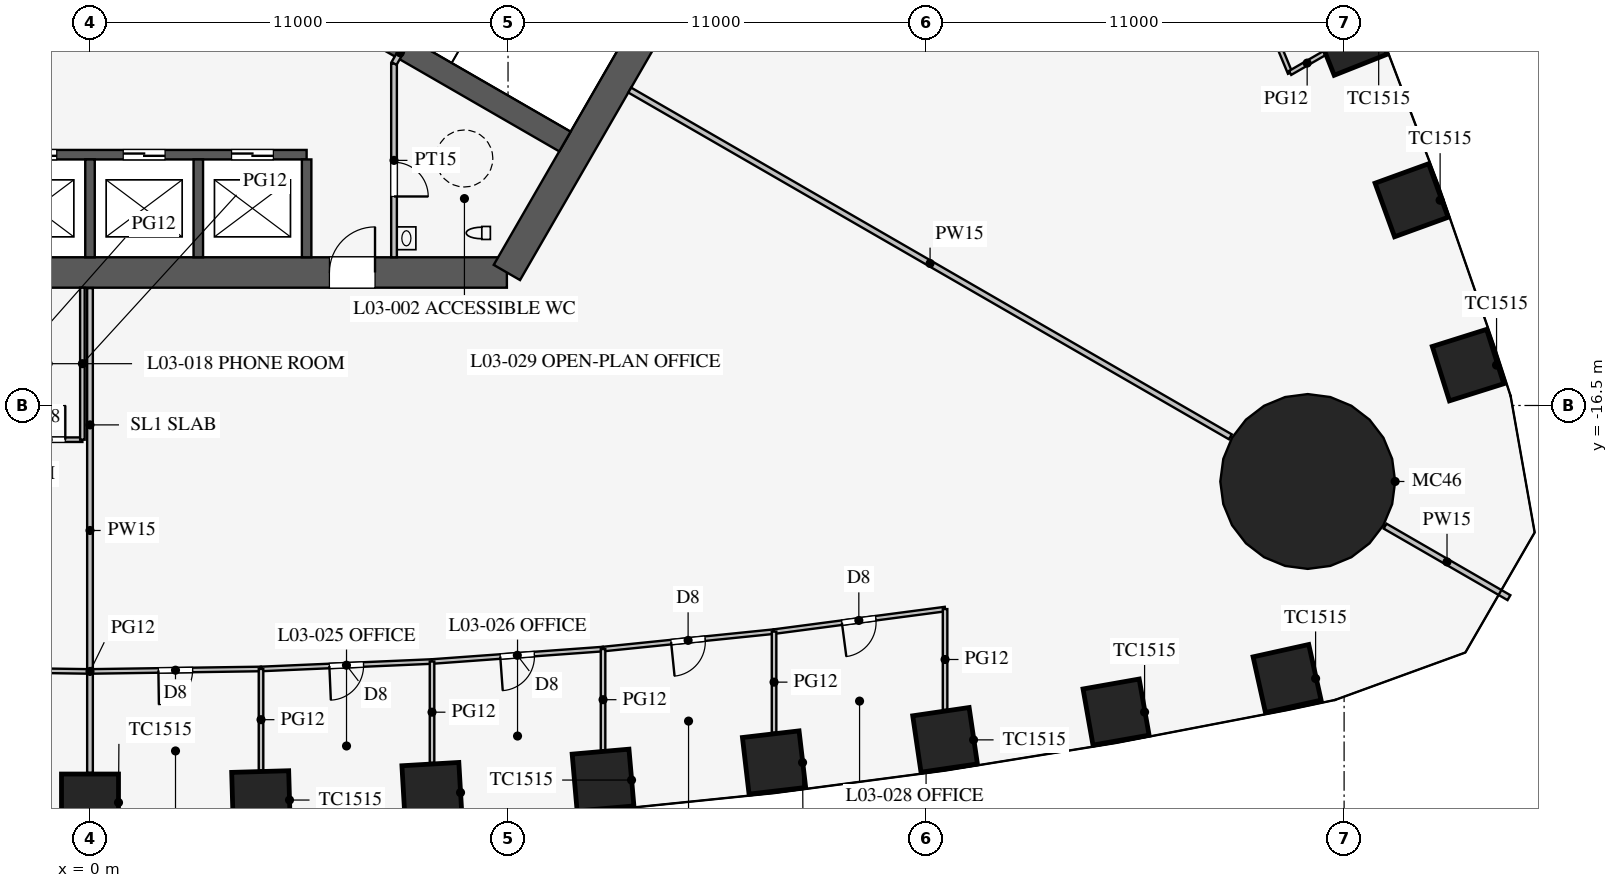
"""IFC4 building model, lengths in metres.
Left out: names, types, materials, properties, quantities, classifications, styles, units other than length and angle.
Written with IfcOpenShell. Run it as: python <this file> out.ifc"""

import sys

from ifc_helpers import new_model, si_unit, direction, frame, frame_2d, origin, origin_2d, place, context, subcontext, project, spatial, rectangle, circle, extrude, element, fill, save


model = new_model("IFC4")
c1 = context("Model", 3, precision=1e-05, world=origin(), true_north=direction((0.0, 1.0)))
c2 = subcontext(c1, "Body", "Model", "MODEL_VIEW")
j1 = project(units=[si_unit("LENGTHUNIT", "METRE"), si_unit("PLANEANGLEUNIT", "RADIAN")], contexts=[c1])
p1 = place(None, origin())
s1 = spatial("IfcSite", under=j1, at=p1, CompositionType="ELEMENT")
p2 = place(p1, origin())
s2 = spatial("IfcBuilding", under=s1, at=p2, CompositionType="ELEMENT")
p3 = place(p2, frame((0.0, 0.0, 16.5)))
s3 = spatial("IfcBuildingStorey", under=s2, at=p3, CompositionType="ELEMENT", Elevation=16.5)
for number, where, z_axis, x_axis in (
    (1, (0.0, -26.949, 0.0), (0.0, 0.0, 1.0), (1.0, 0.0, 0.0)),
    (2, (4.5, -26.883, 0.0), (0.0, 0.0, 1.0), (1.0, 0.029, 0.0)),
    (3, (9.0, -26.686, 0.0), (0.0, 0.0, 1.0), (0.998, 0.058, 0.0)),
    (4, (13.5, -26.357, 0.0), (0.0, 0.0, 1.0), (0.996, 0.087, 0.0)),
    (5, (18.0, -25.895, 0.0), (0.0, 0.0, 1.0), (0.993, 0.116, 0.0)),
    (6, (22.5, -25.299, 0.0), (0.0, 0.0, 1.0), (0.989, 0.145, 0.0)),
    (7, (27.0, -24.568, 0.0), (0.0, 0.0, 1.0), (0.985, 0.174, 0.0)),
    (8, (31.5, -23.685, 0.0), (0.0, 0.0, 1.0), (0.976, 0.217, 0.0)),
    (9, (36.262, -15.438, 0.0), (0.0, 0.0, 1.0), (-0.3, 0.954, 0.0)),
    (10, (34.776, -11.099, 0.0), (0.0, 0.0, 1.0), (-0.342, 0.94, 0.0)),
    (11, (33.16, -6.836, 0.0), (0.0, 0.0, 1.0), (-0.369, 0.929, 0.0)),
):
    element("IfcColumn", number, at=place(p3, frame(where, z_axis=z_axis, x_axis=x_axis)), inside=s3, PredefinedType="COLUMN", context=c2, shape_type="SweptSolid", body=[
        extrude(rectangle(XDim=1.5, YDim=1.5, at=origin_2d()), origin(), (0.0, 0.0, 1.0), 4.2),
    ])
p4 = place(p3, frame((32.043, -18.5, 0.0), z_axis=(0.0, 0.0, 1.0), x_axis=(1.0, 0.0, 0.0)))
e12 = element("IfcColumn", 12, at=p4, inside=s3, PredefinedType="COLUMN", context=c2, shape_type="SweptSolid", body=[
    extrude(circle(Radius=2.3, at=origin_2d()), origin(), (0.0, 0.0, 1.0), 4.2),
])
p5 = place(p3, frame((-10.97, -13.0, 0.0), z_axis=(0.0, 0.0, 1.0), x_axis=(1.0, 0.0, 0.0)))
e13 = element("IfcWall", 13, at=p5, inside=s3, PredefinedType="SHEAR", context=c2, shape_type="SweptSolid", body=[
    extrude(rectangle(XDim=21.939, YDim=0.8, at=frame_2d((10.97, 0.0))), origin(), (0.0, 0.0, 1.0), 4.2),
])
p6 = place(p5, frame((17.27, 0.0, 0.0)))
e14 = element("IfcOpeningElement", 14, at=p6, cuts=e13, PredefinedType="OPENING", context=c2, shape_type="SweptSolid", body=[
    extrude(rectangle(XDim=1.2, YDim=2.1, at=frame_2d((0.6, 1.05))), frame((0.0, 0.41, 0.0), z_axis=(0.0, -1.0, 0.0), x_axis=(1.0, 0.0, 0.0)), (0.0, 0.0, 1.0), 0.82),
])
p7 = place(p5, frame((3.47, 0.0, 0.0)))
e15 = element("IfcOpeningElement", 15, at=p7, cuts=e13, PredefinedType="OPENING", context=c2, shape_type="SweptSolid", body=[
    extrude(rectangle(XDim=1.2, YDim=2.1, at=frame_2d((0.6, 1.05))), frame((0.0, 0.41, 0.0), z_axis=(0.0, -1.0, 0.0), x_axis=(1.0, 0.0, 0.0)), (0.0, 0.0, 1.0), 0.82),
])
p8 = place(p3, frame((10.97, -13.0, 0.0), z_axis=(0.0, 0.0, 1.0), x_axis=(0.499995765644, 0.866027848477, 0.0)))
e16 = element("IfcWall", 16, at=p8, inside=s3, PredefinedType="SHEAR", context=c2, shape_type="SweptSolid", body=[
    extrude(rectangle(XDim=11.547, YDim=0.8, at=frame_2d((5.773, 0.0))), origin(), (0.0, 0.0, 1.0), 4.2),
])
p9 = place(p3, frame((-5.7, -9.9, 0.0), z_axis=(0.0, 0.0, 1.0), x_axis=(1.0, 0.0, 0.0)))
e17 = element("IfcWall", 17, at=p9, inside=s3, PredefinedType="SHEAR", context=c2, shape_type="SweptSolid", body=[
    extrude(rectangle(XDim=11.4, YDim=0.25, at=frame_2d((5.7, 0.0))), origin(), (0.0, 0.0, 1.0), 4.2),
])
p10 = place(p9, frame((0.875, 0.0, 0.0)))
e18 = element("IfcOpeningElement", 18, at=p10, cuts=e17, PredefinedType="OPENING", context=c2, shape_type="SweptSolid", body=[
    extrude(rectangle(XDim=1.1, YDim=2.2, at=frame_2d((0.55, 1.1))), frame((0.0, 0.135, 0.0), z_axis=(0.0, -1.0, 0.0), x_axis=(1.0, 0.0, 0.0)), (0.0, 0.0, 1.0), 0.27),
])
p11 = place(p9, frame((3.725, 0.0, 0.0)))
e19 = element("IfcOpeningElement", 19, at=p11, cuts=e17, PredefinedType="OPENING", context=c2, shape_type="SweptSolid", body=[
    extrude(rectangle(XDim=1.1, YDim=2.2, at=frame_2d((0.55, 1.1))), frame((0.0, 0.135, 0.0), z_axis=(0.0, -1.0, 0.0), x_axis=(1.0, 0.0, 0.0)), (0.0, 0.0, 1.0), 0.27),
])
p12 = place(p9, frame((6.575, 0.0, 0.0)))
e20 = element("IfcOpeningElement", 20, at=p12, cuts=e17, PredefinedType="OPENING", context=c2, shape_type="SweptSolid", body=[
    extrude(rectangle(XDim=1.1, YDim=2.2, at=frame_2d((0.55, 1.1))), frame((0.0, 0.135, 0.0), z_axis=(0.0, -1.0, 0.0), x_axis=(1.0, 0.0, 0.0)), (0.0, 0.0, 1.0), 0.27),
])
p13 = place(p9, frame((9.425, 0.0, 0.0)))
e21 = element("IfcOpeningElement", 21, at=p13, cuts=e17, PredefinedType="OPENING", context=c2, shape_type="SweptSolid", body=[
    extrude(rectangle(XDim=1.1, YDim=2.2, at=frame_2d((0.55, 1.1))), frame((0.0, 0.135, 0.0), z_axis=(0.0, -1.0, 0.0), x_axis=(1.0, 0.0, 0.0)), (0.0, 0.0, 1.0), 0.27),
])
for number, where, z_axis, x_axis in (
    (22, (0.0, -10.025, 0.0), (0.0, 0.0, 1.0), (0.0, -1.0, 0.0)),
    (23, (2.85, -10.025, 0.0), (0.0, 0.0, 1.0), (0.0, -1.0, 0.0)),
    (24, (5.7, -10.025, 0.0), (0.0, 0.0, 1.0), (0.0, -1.0, 0.0)),
):
    element("IfcWall", number, at=place(p3, frame(where, z_axis=z_axis, x_axis=x_axis)), inside=s3, PredefinedType="SHEAR", context=c2, shape_type="SweptSolid", body=[
        extrude(rectangle(XDim=2.575, YDim=0.25, at=frame_2d((1.288, 0.0))), origin(), (0.0, 0.0, 1.0), 4.2),
    ])
p14 = place(p3, frame((4.638, -5.016, 0.0), z_axis=(0.0, 0.0, 1.0), x_axis=(0.866019375473, -0.500010441196, 0.0)))
e25 = element("IfcWall", 25, at=p14, inside=s3, PredefinedType="SHEAR", context=c2, shape_type="SweptSolid", body=[
    extrude(rectangle(XDim=9.075, YDim=0.6, at=frame_2d((4.538, 0.0))), origin(), (0.0, 0.0, 1.0), 4.2),
])
p15 = place(p3, frame((8.0, -7.5, 0.0), z_axis=(0.0, 0.0, 1.0), x_axis=(0.0, -1.0, 0.0)))
e26 = element("IfcWall", 26, at=p15, inside=s3, PredefinedType="PARTITIONING", context=c2, shape_type="SweptSolid", body=[
    extrude(rectangle(XDim=5.1, YDim=0.15, at=frame_2d((2.55, 0.0))), origin(), (0.0, 0.0, 1.0), 4.0),
])
p16 = place(p15, frame((2.6, 0.0, 0.0)))
e27 = element("IfcOpeningElement", 27, at=p16, cuts=e26, PredefinedType="OPENING", context=c2, shape_type="SweptSolid", body=[
    extrude(rectangle(XDim=0.9, YDim=2.1, at=frame_2d((0.45, 1.05))), frame((0.0, 0.085, 0.0), z_axis=(0.0, -1.0, 0.0), x_axis=(1.0, 0.0, 0.0)), (0.0, 0.0, 1.0), 0.17),
])
p17 = place(p3, frame((8.0, -7.5, 0.0), z_axis=(0.0, 0.0, 1.0), x_axis=(0.499842556608, 0.866116284689, 0.0)))
e28 = element("IfcWall", 28, at=p17, inside=s3, PredefinedType="PARTITIONING", context=c2, shape_type="SweptSolid", body=[
    extrude(rectangle(XDim=0.645, YDim=0.15, at=frame_2d((0.323, 0.0))), origin(), (0.0, 0.0, 1.0), 4.0),
])
p18 = place(p3, frame((14.203, -8.2, 0.0), z_axis=(0.0, 0.0, 1.0), x_axis=(0.866024965723, -0.500000758745, 0.0)))
e29 = element("IfcWall", 29, at=p18, inside=s3, PredefinedType="PARTITIONING", context=c2, shape_type="SweptSolid", body=[
    extrude(rectangle(XDim=18.25, YDim=0.15, at=frame_2d((9.125, 0.0))), origin(), (0.0, 0.0, 1.0), 2.3),
])
p19 = place(p3, frame((34.078, -19.675, 0.0), z_axis=(0.0, 0.0, 1.0), x_axis=(0.866019247219, -0.500010663332, 0.0)))
e30 = element("IfcWall", 30, at=p19, inside=s3, PredefinedType="PARTITIONING", context=c2, shape_type="SweptSolid", body=[
    extrude(rectangle(XDim=3.764, YDim=0.15, at=frame_2d((1.882, 0.0))), origin(), (0.0, 0.0, 1.0), 2.3),
])
p20 = place(p3, frame((0.0, -13.41, 0.0), z_axis=(0.0, 0.0, 1.0), x_axis=(0.0, -1.0, 0.0)))
e31 = element("IfcWall", 31, at=p20, inside=s3, PredefinedType="PARTITIONING", context=c2, shape_type="SweptSolid", body=[
    extrude(rectangle(XDim=12.759, YDim=0.15, at=frame_2d((6.379, 0.0))), origin(), (0.0, 0.0, 1.0), 3.2),
])
p21 = place(p3, frame((-2.0, -17.4, 0.0), z_axis=(0.0, 0.0, 1.0), x_axis=(1.0, 0.0, 0.0)))
e32 = element("IfcWall", 32, at=p21, inside=s3, PredefinedType="PARTITIONING", context=c2, shape_type="SweptSolid", body=[
    extrude(rectangle(XDim=1.8, YDim=0.12, at=frame_2d((0.9, 0.0))), origin(), (0.0, 0.0, 1.0), 2.9),
])
p22 = place(p21, frame((0.45, 0.0, 0.15)))
e33 = element("IfcOpeningElement", 33, at=p22, cuts=e32, PredefinedType="OPENING", context=c2, shape_type="SweptSolid", body=[
    extrude(rectangle(XDim=0.9, YDim=2.1, at=frame_2d((0.45, 1.05))), frame((0.0, 0.07, 0.0), z_axis=(0.0, -1.0, 0.0), x_axis=(1.0, 0.0, 0.0)), (0.0, 0.0, 1.0), 0.14),
])
p23 = place(p3, frame((-0.2, -13.4, 0.0), z_axis=(0.0, 0.0, 1.0), x_axis=(0.0, -1.0, 0.0)))
e34 = element("IfcWall", 34, at=p23, inside=s3, PredefinedType="PARTITIONING", context=c2, shape_type="SweptSolid", body=[
    extrude(rectangle(XDim=4.0, YDim=0.12, at=frame_2d((2.0, 0.0))), origin(), (0.0, 0.0, 1.0), 2.9),
])
p24 = place(p3, frame((0.0, -23.499, 0.0), z_axis=(0.0, 0.0, 1.0), x_axis=(0.999894311967, 0.014538393859, 0.0)))
e35 = element("IfcWall", 35, at=p24, inside=s3, PredefinedType="PARTITIONING", context=c2, shape_type="SweptSolid", body=[
    extrude(rectangle(XDim=4.5, YDim=0.12, at=frame_2d((2.25, 0.0))), origin(), (0.0, 0.0, 1.0), 2.9),
])
p25 = place(p24, frame((1.8, 0.0, 0.15)))
e36 = element("IfcOpeningElement", 36, at=p25, cuts=e35, PredefinedType="OPENING", context=c2, shape_type="SweptSolid", body=[
    extrude(rectangle(XDim=0.9, YDim=2.1, at=frame_2d((0.45, 1.05))), frame((0.0, 0.07, 0.0), z_axis=(0.0, -1.0, 0.0), x_axis=(1.0, 0.0, 0.0)), (0.0, 0.0, 1.0), 0.14),
])
p26 = place(p3, frame((13.5, -22.91, 0.0), z_axis=(0.0, 0.0, 1.0), x_axis=(0.994833141332, 0.101523499286, 0.0)))
e37 = element("IfcWall", 37, at=p26, inside=s3, PredefinedType="PARTITIONING", context=c2, shape_type="SweptSolid", body=[
    extrude(rectangle(XDim=4.523, YDim=0.12, at=frame_2d((2.262, 0.0))), origin(), (0.0, 0.0, 1.0), 2.9),
])
p27 = place(p26, frame((1.8, 0.0, 0.15)))
e38 = element("IfcOpeningElement", 38, at=p27, cuts=e37, PredefinedType="OPENING", context=c2, shape_type="SweptSolid", body=[
    extrude(rectangle(XDim=0.9, YDim=2.1, at=frame_2d((0.45, 1.05))), frame((0.0, 0.07, 0.0), z_axis=(0.0, -1.0, 0.0), x_axis=(1.0, 0.0, 0.0)), (0.0, 0.0, 1.0), 0.14),
])
p28 = place(p3, frame((18.0, -22.451, 0.0), z_axis=(0.0, 0.0, 1.0), x_axis=(0.991435244698, 0.130599217346, 0.0)))
e39 = element("IfcWall", 39, at=p28, inside=s3, PredefinedType="PARTITIONING", context=c2, shape_type="SweptSolid", body=[
    extrude(rectangle(XDim=4.539, YDim=0.12, at=frame_2d((2.27, 0.0))), origin(), (0.0, 0.0, 1.0), 2.9),
])
p29 = place(p28, frame((1.8, 0.0, 0.15)))
e40 = element("IfcOpeningElement", 40, at=p29, cuts=e39, PredefinedType="OPENING", context=c2, shape_type="SweptSolid", body=[
    extrude(rectangle(XDim=0.9, YDim=2.1, at=frame_2d((0.45, 1.05))), frame((0.0, 0.07, 0.0), z_axis=(0.0, -1.0, 0.0), x_axis=(1.0, 0.0, 0.0)), (0.0, 0.0, 1.0), 0.14),
])
p30 = place(p3, frame((4.5, -23.433, 0.0), z_axis=(0.0, 0.0, 1.0), x_axis=(0.999052370647, 0.043524254212, 0.0)))
e41 = element("IfcWall", 41, at=p30, inside=s3, PredefinedType="PARTITIONING", context=c2, shape_type="SweptSolid", body=[
    extrude(rectangle(XDim=4.504, YDim=0.12, at=frame_2d((2.252, 0.0))), origin(), (0.0, 0.0, 1.0), 2.9),
])
p31 = place(p30, frame((1.8, 0.0, 0.15)))
e42 = element("IfcOpeningElement", 42, at=p31, cuts=e41, PredefinedType="OPENING", context=c2, shape_type="SweptSolid", body=[
    extrude(rectangle(XDim=0.9, YDim=2.1, at=frame_2d((0.45, 1.05))), frame((0.0, 0.07, 0.0), z_axis=(0.0, -1.0, 0.0), x_axis=(1.0, 0.0, 0.0)), (0.0, 0.0, 1.0), 0.14),
])
p32 = place(p3, frame((9.0, -23.237, 0.0), z_axis=(0.0, 0.0, 1.0), x_axis=(0.997363894896, 0.072562119306, 0.0)))
e43 = element("IfcWall", 43, at=p32, inside=s3, PredefinedType="PARTITIONING", context=c2, shape_type="SweptSolid", body=[
    extrude(rectangle(XDim=4.512, YDim=0.12, at=frame_2d((2.256, 0.0))), origin(), (0.0, 0.0, 1.0), 2.9),
])
p33 = place(p32, frame((1.8, 0.0, 0.15)))
e44 = element("IfcOpeningElement", 44, at=p33, cuts=e43, PredefinedType="OPENING", context=c2, shape_type="SweptSolid", body=[
    extrude(rectangle(XDim=0.9, YDim=2.1, at=frame_2d((0.45, 1.05))), frame((0.0, 0.07, 0.0), z_axis=(0.0, -1.0, 0.0), x_axis=(1.0, 0.0, 0.0)), (0.0, 0.0, 1.0), 0.14),
])
p34 = place(p3, frame((-4.5, -23.433, 0.0), z_axis=(0.0, 0.0, 1.0), x_axis=(0.999894311967, -0.014538393859, 0.0)))
e45 = element("IfcWall", 45, at=p34, inside=s3, PredefinedType="PARTITIONING", context=c2, shape_type="SweptSolid", body=[
    extrude(rectangle(XDim=4.5, YDim=0.12, at=frame_2d((2.25, 0.0))), origin(), (0.0, 0.0, 1.0), 2.9),
])
p35 = place(p34, frame((1.8, 0.0, 0.15)))
e46 = element("IfcOpeningElement", 46, at=p35, cuts=e45, PredefinedType="OPENING", context=c2, shape_type="SweptSolid", body=[
    extrude(rectangle(XDim=0.9, YDim=2.1, at=frame_2d((0.45, 1.05))), frame((0.0, 0.07, 0.0), z_axis=(0.0, -1.0, 0.0), x_axis=(1.0, 0.0, 0.0)), (0.0, 0.0, 1.0), 0.14),
])
p36 = place(p3, frame((13.5, -22.91, 0.0), z_axis=(0.0, 0.0, 1.0), x_axis=(0.0, -1.0, 0.0)))
e47 = element("IfcWall", 47, at=p36, inside=s3, PredefinedType="PARTITIONING", context=c2, shape_type="SweptSolid", body=[
    extrude(rectangle(XDim=2.664, YDim=0.12, at=frame_2d((1.332, 0.0))), origin(), (0.0, 0.0, 1.0), 2.9),
])
p37 = place(p3, frame((18.0, -22.451, 0.0), z_axis=(0.0, 0.0, 1.0), x_axis=(0.0, -1.0, 0.0)))
e48 = element("IfcWall", 48, at=p37, inside=s3, PredefinedType="PARTITIONING", context=c2, shape_type="SweptSolid", body=[
    extrude(rectangle(XDim=2.659, YDim=0.12, at=frame_2d((1.33, 0.0))), origin(), (0.0, 0.0, 1.0), 2.9),
])
p38 = place(p3, frame((22.5, -21.858, 0.0), z_axis=(0.0, 0.0, 1.0), x_axis=(0.0, -1.0, 0.0)))
e49 = element("IfcWall", 49, at=p38, inside=s3, PredefinedType="PARTITIONING", context=c2, shape_type="SweptSolid", body=[
    extrude(rectangle(XDim=2.653, YDim=0.12, at=frame_2d((1.327, 0.0))), origin(), (0.0, 0.0, 1.0), 2.9),
])
p39 = place(p3, frame((4.5, -23.433, 0.0), z_axis=(0.0, 0.0, 1.0), x_axis=(0.0, -1.0, 0.0)))
e50 = element("IfcWall", 50, at=p39, inside=s3, PredefinedType="PARTITIONING", context=c2, shape_type="SweptSolid", body=[
    extrude(rectangle(XDim=2.669, YDim=0.12, at=frame_2d((1.335, 0.0))), origin(), (0.0, 0.0, 1.0), 2.9),
])
p40 = place(p3, frame((9.0, -23.237, 0.0), z_axis=(0.0, 0.0, 1.0), x_axis=(0.0, -1.0, 0.0)))
e51 = element("IfcWall", 51, at=p40, inside=s3, PredefinedType="PARTITIONING", context=c2, shape_type="SweptSolid", body=[
    extrude(rectangle(XDim=2.667, YDim=0.12, at=frame_2d((1.334, 0.0))), origin(), (0.0, 0.0, 1.0), 2.9),
])
p41 = place(p3, frame((31.578, -7.749, 0.0), z_axis=(0.0, 0.0, 1.0), x_axis=(-0.38265900014, 0.923889652292, 0.0)))
e52 = element("IfcWall", 52, at=p41, inside=s3, PredefinedType="PARTITIONING", context=c2, shape_type="SweptSolid", body=[
    extrude(rectangle(XDim=4.539, YDim=0.12, at=frame_2d((2.27, 0.0))), origin(), (0.0, 0.0, 1.0), 2.9),
])
p42 = place(p41, frame((1.8, 0.0, 0.15)))
e53 = element("IfcOpeningElement", 53, at=p42, cuts=e52, PredefinedType="OPENING", context=c2, shape_type="SweptSolid", body=[
    extrude(rectangle(XDim=0.9, YDim=2.1, at=frame_2d((0.45, 1.05))), frame((0.0, 0.07, 0.0), z_axis=(0.0, -1.0, 0.0), x_axis=(1.0, 0.0, 0.0)), (0.0, 0.0, 1.0), 0.14),
])
p43 = place(p3, frame((31.578, -7.749, 0.0), z_axis=(0.0, 0.0, 1.0), x_axis=(0.866064200236, 0.499932796552, 0.0)))
e54 = element("IfcWall", 54, at=p43, inside=s3, PredefinedType="PARTITIONING", context=c2, shape_type="SweptSolid", body=[
    extrude(rectangle(XDim=1.038, YDim=0.12, at=frame_2d((0.519, 0.0))), origin(), (0.0, 0.0, 1.0), 2.9),
])
p44 = place(p16, origin())
e55 = element("IfcDoor", 55, at=p44, inside=s3, OperationType="SINGLE_SWING_RIGHT", PredefinedType="DOOR", context=c2, shape_type="SweptSolid", body=[
    extrude(rectangle(XDim=0.9, YDim=2.1, at=frame_2d((0.45, 1.05))), frame((0.0, 0.025, 0.0), z_axis=(0.0, -1.0, 0.0), x_axis=(1.0, 0.0, 0.0)), (0.0, 0.0, 1.0), 0.05),
])
fill(e27, e55)
p45 = place(p6, origin())
e56 = element("IfcDoor", 56, at=p45, inside=s3, OperationType="SINGLE_SWING_RIGHT", PredefinedType="DOOR", context=c2, shape_type="SweptSolid", body=[
    extrude(rectangle(XDim=1.2, YDim=2.1, at=frame_2d((0.6, 1.05))), frame((0.0, 0.025, 0.0), z_axis=(0.0, -1.0, 0.0), x_axis=(1.0, 0.0, 0.0)), (0.0, 0.0, 1.0), 0.05),
])
fill(e14, e56)
p46 = place(p22, origin())
e57 = element("IfcDoor", 57, at=p46, inside=s3, OperationType="SINGLE_SWING_RIGHT", PredefinedType="DOOR", context=c2, shape_type="SweptSolid", body=[
    extrude(rectangle(XDim=0.9, YDim=2.1, at=frame_2d((0.45, 1.05))), frame((0.0, 0.025, 0.0), z_axis=(0.0, -1.0, 0.0), x_axis=(1.0, 0.0, 0.0)), (0.0, 0.0, 1.0), 0.05),
])
fill(e33, e57)
p47 = place(p25, frame((0.9, 0.0, 0.0), z_axis=(0.0, 0.0, 1.0), x_axis=(-1.0, 0.0, 0.0)))
e58 = element("IfcDoor", 58, at=p47, inside=s3, OperationType="SINGLE_SWING_RIGHT", PredefinedType="DOOR", context=c2, shape_type="SweptSolid", body=[
    extrude(rectangle(XDim=0.9, YDim=2.1, at=frame_2d((0.45, 1.05))), frame((0.0, 0.025, 0.0), z_axis=(0.0, -1.0, 0.0), x_axis=(1.0, 0.0, 0.0)), (0.0, 0.0, 1.0), 0.05),
])
fill(e36, e58)
p48 = place(p31, frame((0.9, 0.0, 0.0), z_axis=(0.0, 0.0, 1.0), x_axis=(-1.0, 0.0, 0.0)))
e59 = element("IfcDoor", 59, at=p48, inside=s3, OperationType="SINGLE_SWING_RIGHT", PredefinedType="DOOR", context=c2, shape_type="SweptSolid", body=[
    extrude(rectangle(XDim=0.9, YDim=2.1, at=frame_2d((0.45, 1.05))), frame((0.0, 0.025, 0.0), z_axis=(0.0, -1.0, 0.0), x_axis=(1.0, 0.0, 0.0)), (0.0, 0.0, 1.0), 0.05),
])
fill(e42, e59)
p49 = place(p33, frame((0.9, 0.0, 0.0), z_axis=(0.0, 0.0, 1.0), x_axis=(-1.0, 0.0, 0.0)))
e60 = element("IfcDoor", 60, at=p49, inside=s3, OperationType="SINGLE_SWING_RIGHT", PredefinedType="DOOR", context=c2, shape_type="SweptSolid", body=[
    extrude(rectangle(XDim=0.9, YDim=2.1, at=frame_2d((0.45, 1.05))), frame((0.0, 0.025, 0.0), z_axis=(0.0, -1.0, 0.0), x_axis=(1.0, 0.0, 0.0)), (0.0, 0.0, 1.0), 0.05),
])
fill(e44, e60)
p50 = place(p27, frame((0.9, 0.0, 0.0), z_axis=(0.0, 0.0, 1.0), x_axis=(-1.0, 0.0, 0.0)))
e61 = element("IfcDoor", 61, at=p50, inside=s3, OperationType="SINGLE_SWING_RIGHT", PredefinedType="DOOR", context=c2, shape_type="SweptSolid", body=[
    extrude(rectangle(XDim=0.9, YDim=2.1, at=frame_2d((0.45, 1.05))), frame((0.0, 0.025, 0.0), z_axis=(0.0, -1.0, 0.0), x_axis=(1.0, 0.0, 0.0)), (0.0, 0.0, 1.0), 0.05),
])
fill(e38, e61)
p51 = place(p29, frame((0.9, 0.0, 0.0), z_axis=(0.0, 0.0, 1.0), x_axis=(-1.0, 0.0, 0.0)))
e62 = element("IfcDoor", 62, at=p51, inside=s3, OperationType="SINGLE_SWING_RIGHT", PredefinedType="DOOR", context=c2, shape_type="SweptSolid", body=[
    extrude(rectangle(XDim=0.9, YDim=2.1, at=frame_2d((0.45, 1.05))), frame((0.0, 0.025, 0.0), z_axis=(0.0, -1.0, 0.0), x_axis=(1.0, 0.0, 0.0)), (0.0, 0.0, 1.0), 0.05),
])
fill(e40, e62)
p52 = place(p11, origin())
e63 = element("IfcDoor", 63, at=p52, inside=s3, OperationType="DOUBLE_DOOR_SLIDING", PredefinedType="DOOR", context=c2, shape_type="SweptSolid", body=[
    extrude(rectangle(XDim=1.1, YDim=2.2, at=frame_2d((0.55, 1.1))), frame((0.0, 0.025, 0.0), z_axis=(0.0, -1.0, 0.0), x_axis=(1.0, 0.0, 0.0)), (0.0, 0.0, 1.0), 0.05),
])
fill(e19, e63)
p53 = place(p12, origin())
e64 = element("IfcDoor", 64, at=p53, inside=s3, OperationType="DOUBLE_DOOR_SLIDING", PredefinedType="DOOR", context=c2, shape_type="SweptSolid", body=[
    extrude(rectangle(XDim=1.1, YDim=2.2, at=frame_2d((0.55, 1.1))), frame((0.0, 0.025, 0.0), z_axis=(0.0, -1.0, 0.0), x_axis=(1.0, 0.0, 0.0)), (0.0, 0.0, 1.0), 0.05),
])
fill(e20, e64)
p54 = place(p13, origin())
e65 = element("IfcDoor", 65, at=p54, inside=s3, OperationType="DOUBLE_DOOR_SLIDING", PredefinedType="DOOR", context=c2, shape_type="SweptSolid", body=[
    extrude(rectangle(XDim=1.1, YDim=2.2, at=frame_2d((0.55, 1.1))), frame((0.0, 0.025, 0.0), z_axis=(0.0, -1.0, 0.0), x_axis=(1.0, 0.0, 0.0)), (0.0, 0.0, 1.0), 0.05),
])
fill(e21, e65)
save(model, sys.argv[1])
